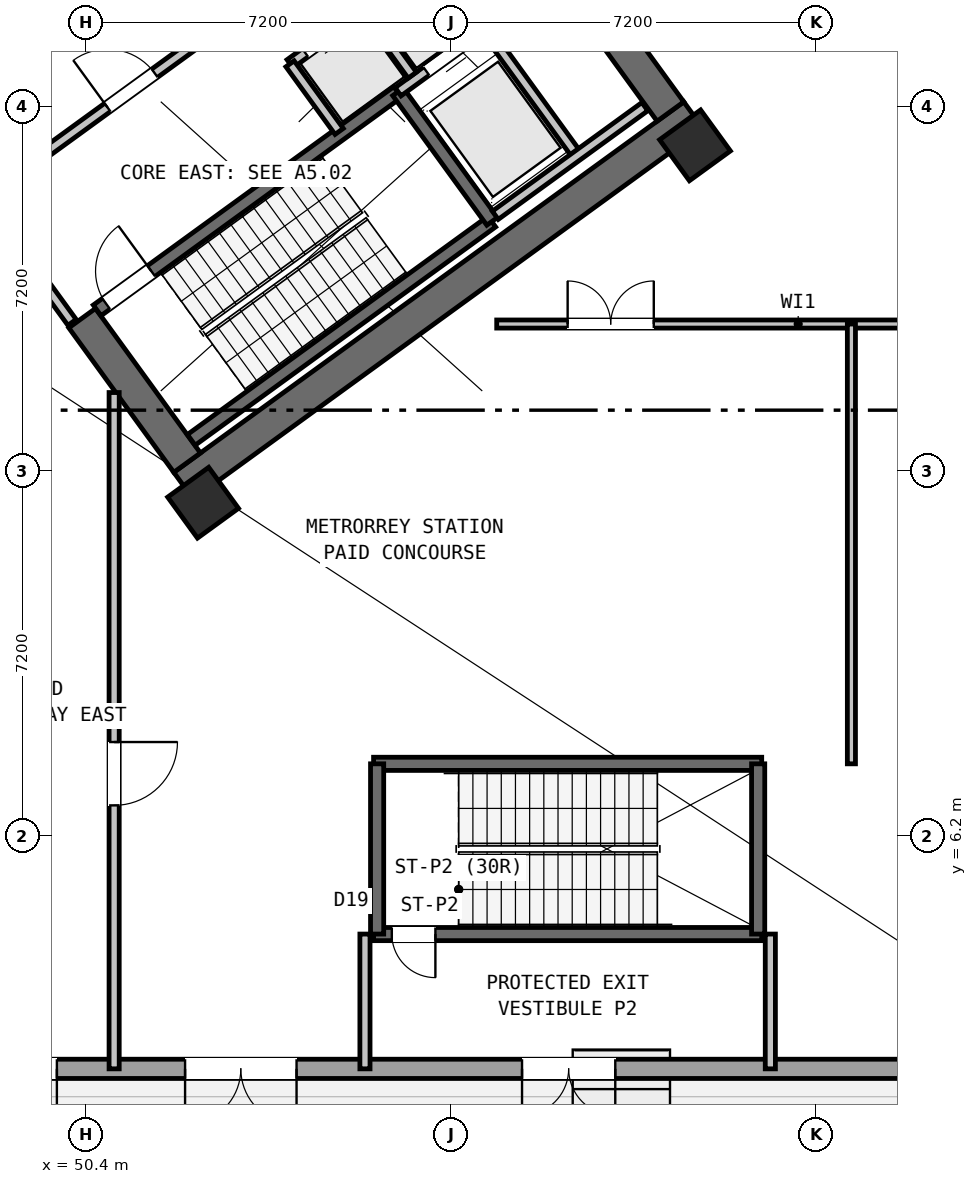
"""IFC4 building model, lengths in metres.
Left out: names, types, materials, properties, quantities, classifications, styles, units other than length and angle.
Written with IfcOpenShell. Run it as: python <this file> out.ifc"""

import sys

from ifc_helpers import new_model, si_unit, direction, frame, frame_2d, origin, origin_2d, place, context, subcontext, project, spatial, rectangle, hollow_rectangle, extrude, source, transform, mapped, element, fill, save


model = new_model("IFC4")
c1 = context("Model", 3, precision=1e-05, world=origin(), true_north=direction((0.0, 1.0)))
c2 = subcontext(c1, "Body", "Model", "MODEL_VIEW")
j1 = project(units=[si_unit("LENGTHUNIT", "METRE"), si_unit("PLANEANGLEUNIT", "RADIAN")], contexts=[c1])
p1 = place(None, origin())
s1 = spatial("IfcSite", under=j1, at=p1, CompositionType="ELEMENT")
p2 = place(p1, origin())
s2 = spatial("IfcBuilding", under=s1, at=p2, CompositionType="ELEMENT")
p3 = place(p2, origin())
s3 = spatial("IfcBuildingStorey", under=s2, at=p3, CompositionType="ELEMENT", Elevation=0.0)
p4 = place(p3, frame((52.318, 13.11, 0.0), z_axis=(0.0, 0.0, 1.0), x_axis=(0.809019445368, 0.587781878776, 0.0)))
e1 = element("IfcWall", 1, at=p4, inside=s3, PredefinedType="SHEAR", context=c2, shape_type="SweptSolid", body=[
    extrude(rectangle(XDim=12.44, YDim=0.65, at=frame_2d((6.22, 0.0))), origin(), (0.0, 0.0, 1.0), 5.05),
])
p5 = place(p3, frame((52.39, 13.564, 0.0), z_axis=(0.0, 0.0, 1.0), x_axis=(-0.58779688989, 0.809008539037, 0.0)))
e2 = element("IfcWall", 2, at=p5, inside=s3, PredefinedType="SHEAR", context=c2, shape_type="SweptSolid", body=[
    extrude(rectangle(XDim=3.525, YDim=0.65, at=frame_2d((1.763, 0.0))), origin(), (0.0, 0.0, 1.0), 5.05),
])
p6 = place(p3, frame((61.929, 20.494, 0.0), z_axis=(0.0, 0.0, 1.0), x_axis=(-0.58782982593, 0.808984607855, 0.0)))
e3 = element("IfcWall", 3, at=p6, inside=s3, PredefinedType="SHEAR", context=c2, shape_type="SweptSolid", body=[
    extrude(rectangle(XDim=3.525, YDim=0.65, at=frame_2d((1.762, 0.0))), origin(), (0.0, 0.0, 1.0), 5.05),
])
m1 = source(origin(), c2, "Body", "SweptSolid", [
    extrude(hollow_rectangle(XDim=1.0, YDim=1.0, WallThickness=0.04, at=origin_2d()), origin(), (0.0, 0.0, 1.0), 5.4),
])
for number, where, z_axis, x_axis in (
    (4, (52.705, 12.773, 0.0), (0.0, 0.0, 1.0), (0.809, 0.588, 0.0)),
    (5, (62.414, 19.827, 0.0), (0.0, 0.0, 1.0), (0.809, 0.588, 0.0)),
):
    element("IfcColumn", number, at=place(p3, frame(where, z_axis=z_axis, x_axis=x_axis)), inside=s3, PredefinedType="COLUMN", context=c2, shape_type="MappedRepresentation", body=[
        mapped(m1, transform((0.0, 0.0, 0.0), scale=1.0)),
    ])
p7 = place(p3, frame((67.117, 1.6, 0.0), z_axis=(0.0, 0.0, 1.0), x_axis=(-1.0, 0.0, 0.0)))
e6 = element("IfcWall", 6, at=p7, inside=s3, PredefinedType="STANDARD", context=c2, shape_type="SweptSolid", body=[
    extrude(rectangle(XDim=62.234, YDim=0.38, at=frame_2d((31.117, 0.0))), origin(), (0.0, 0.0, 1.0), 3.755),
])
p8 = place(p7, frame((53.077, 0.0, 0.0)))
e7 = element("IfcOpeningElement", 7, at=p8, cuts=e6, PredefinedType="OPENING", context=c2, shape_type="SweptSolid", body=[
    extrude(rectangle(XDim=1.84, YDim=2.4, at=frame_2d((0.92, 1.2))), frame((0.0, 0.2, 0.0), z_axis=(0.0, -1.0, 0.0), x_axis=(1.0, 0.0, 0.0)), (0.0, 0.0, 1.0), 0.4),
])
p9 = place(p7, frame((39.517, 0.0, 0.0)))
e8 = element("IfcOpeningElement", 8, at=p9, cuts=e6, PredefinedType="OPENING", context=c2, shape_type="SweptSolid", body=[
    extrude(rectangle(XDim=2.2, YDim=2.6, at=frame_2d((1.1, 1.3))), frame((0.0, 0.2, 0.0), z_axis=(0.0, -1.0, 0.0), x_axis=(1.0, 0.0, 0.0)), (0.0, 0.0, 1.0), 0.4),
])
p10 = place(p7, frame((32.917, 0.0, 0.0)))
e9 = element("IfcOpeningElement", 9, at=p10, cuts=e6, PredefinedType="OPENING", context=c2, shape_type="SweptSolid", body=[
    extrude(rectangle(XDim=2.2, YDim=2.6, at=frame_2d((1.1, 1.3))), frame((0.0, 0.2, 0.0), z_axis=(0.0, -1.0, 0.0), x_axis=(1.0, 0.0, 0.0)), (0.0, 0.0, 1.0), 0.4),
])
p11 = place(p7, frame((26.997, 0.0, 0.0)))
e10 = element("IfcOpeningElement", 10, at=p11, cuts=e6, PredefinedType="OPENING", context=c2, shape_type="SweptSolid", body=[
    extrude(rectangle(XDim=1.84, YDim=2.4, at=frame_2d((0.92, 1.2))), frame((0.0, 0.2, 0.0), z_axis=(0.0, -1.0, 0.0), x_axis=(1.0, 0.0, 0.0)), (0.0, 0.0, 1.0), 0.4),
])
p12 = place(p7, frame((21.017, 0.0, 0.0)))
e11 = element("IfcOpeningElement", 11, at=p12, cuts=e6, PredefinedType="OPENING", context=c2, shape_type="SweptSolid", body=[
    extrude(rectangle(XDim=2.2, YDim=2.6, at=frame_2d((1.1, 1.3))), frame((0.0, 0.2, 0.0), z_axis=(0.0, -1.0, 0.0), x_axis=(1.0, 0.0, 0.0)), (0.0, 0.0, 1.0), 0.4),
])
p13 = place(p7, frame((17.297, 0.0, 0.0)))
e12 = element("IfcOpeningElement", 12, at=p13, cuts=e6, PredefinedType="OPENING", context=c2, shape_type="SweptSolid", body=[
    extrude(rectangle(XDim=1.84, YDim=2.4, at=frame_2d((0.92, 1.2))), frame((0.0, 0.2, 0.0), z_axis=(0.0, -1.0, 0.0), x_axis=(1.0, 0.0, 0.0)), (0.0, 0.0, 1.0), 0.4),
])
p14 = place(p7, frame((12.567, 0.0, 0.0)))
e13 = element("IfcOpeningElement", 13, at=p14, cuts=e6, PredefinedType="OPENING", context=c2, shape_type="SweptSolid", body=[
    extrude(rectangle(XDim=2.2, YDim=2.6, at=frame_2d((1.1, 1.3))), frame((0.0, 0.2, 0.0), z_axis=(0.0, -1.0, 0.0), x_axis=(1.0, 0.0, 0.0)), (0.0, 0.0, 1.0), 0.4),
])
p15 = place(p7, frame((6.277, 0.0, 0.0)))
e14 = element("IfcOpeningElement", 14, at=p15, cuts=e6, PredefinedType="OPENING", context=c2, shape_type="SweptSolid", body=[
    extrude(rectangle(XDim=1.84, YDim=2.4, at=frame_2d((0.92, 1.2))), frame((0.0, 0.2, 0.0), z_axis=(0.0, -1.0, 0.0), x_axis=(1.0, 0.0, 0.0)), (0.0, 0.0, 1.0), 0.4),
])
p16 = place(p3, frame((52.472, 14.013, 0.0), z_axis=(0.0, 0.0, 1.0), x_axis=(0.809028366311, 0.587769599847, 0.0)))
e15 = element("IfcWall", 15, at=p16, inside=s3, PredefinedType="SHEAR", context=c2, shape_type="SweptSolid", body=[
    extrude(rectangle(XDim=7.33, YDim=0.26, at=frame_2d((3.665, 0.0))), origin(), (0.0, 0.0, 1.0), 5.05),
])
p17 = place(p3, frame((50.615, 16.57, 0.0), z_axis=(0.0, 0.0, 1.0), x_axis=(0.809028366311, 0.587769599847, 0.0)))
e16 = element("IfcWall", 16, at=p17, inside=s3, PredefinedType="SHEAR", context=c2, shape_type="SweptSolid", body=[
    extrude(rectangle(XDim=7.33, YDim=0.26, at=frame_2d((3.665, 0.0))), origin(), (0.0, 0.0, 1.0), 5.05),
])
p18 = place(p17, frame((0.22, 0.0, 0.0)))
e17 = element("IfcOpeningElement", 17, at=p18, cuts=e16, PredefinedType="OPENING", context=c2, shape_type="SweptSolid", body=[
    extrude(rectangle(XDim=1.1, YDim=2.1, at=frame_2d((0.55, 1.05))), frame((0.0, 0.14, 0.0), z_axis=(0.0, -1.0, 0.0), x_axis=(1.0, 0.0, 0.0)), (0.0, 0.0, 1.0), 0.28),
])
p19 = place(p3, frame((58.41, 18.327, 0.0), z_axis=(0.0, 0.0, 1.0), x_axis=(-0.58776738483, 0.809029975545, 0.0)))
e18 = element("IfcWall", 18, at=p19, inside=s3, PredefinedType="SHEAR", context=c2, shape_type="SweptSolid", body=[
    extrude(rectangle(XDim=3.16, YDim=0.26, at=frame_2d((1.58, 0.0))), origin(), (0.0, 0.0, 1.0), 5.05),
])
p20 = place(p3, frame((47.106, 21.437, 0.0), z_axis=(0.0, 0.0, 1.0), x_axis=(0.809012514015, 0.58779141893, 0.0)))
e19 = element("IfcWall", 19, at=p20, inside=s3, PredefinedType="STANDARD", context=c2, shape_type="SweptSolid", body=[
    extrude(rectangle(XDim=3.398, YDim=0.2, at=frame_2d((1.699, 0.0))), origin(), (0.0, 0.0, 1.0), 5.04),
])
p21 = place(p20, frame((0.408, 0.0, 0.0)))
e20 = element("IfcOpeningElement", 20, at=p21, cuts=e19, PredefinedType="OPENING", context=c2, shape_type="SweptSolid", body=[
    extrude(rectangle(XDim=1.3, YDim=2.2, at=frame_2d((0.65, 1.1))), frame((0.0, 0.11, 0.0), z_axis=(0.0, -1.0, 0.0), x_axis=(1.0, 0.0, 0.0)), (0.0, 0.0, 1.0), 0.22),
])
p22 = place(p3, frame((48.799, 19.107, 0.0), z_axis=(0.0, 0.0, 1.0), x_axis=(0.809012959416, 0.587790805897, 0.0)))
e21 = element("IfcWall", 21, at=p22, inside=s3, PredefinedType="STANDARD", context=c2, shape_type="SweptSolid", body=[
    extrude(rectangle(XDim=5.718, YDim=0.2, at=frame_2d((2.859, 0.0))), origin(), (0.0, 0.0, 1.0), 5.04),
])
p23 = place(p22, frame((2.498, 0.0, 0.0)))
e22 = element("IfcOpeningElement", 22, at=p23, cuts=e21, PredefinedType="OPENING", context=c2, shape_type="SweptSolid", body=[
    extrude(rectangle(XDim=1.15, YDim=2.1, at=frame_2d((0.575, 1.05))), frame((0.0, 0.11, 0.0), z_axis=(0.0, -1.0, 0.0), x_axis=(1.0, 0.0, 0.0)), (0.0, 0.0, 1.0), 0.22),
])
p24 = place(p3, frame((56.553, 20.884, 0.0), z_axis=(0.0, 0.0, 1.0), x_axis=(0.809035789462, 0.587759382205, 0.0)))
e23 = element("IfcWall", 23, at=p24, inside=s3, PredefinedType="STANDARD", context=c2, shape_type="SweptSolid", body=[
    extrude(rectangle(XDim=3.768, YDim=0.2, at=frame_2d((1.884, 0.0))), origin(), (0.0, 0.0, 1.0), 5.04),
])
p25 = place(p24, frame((0.69, 0.0, 0.0)))
e24 = element("IfcOpeningElement", 24, at=p25, cuts=e23, PredefinedType="OPENING", context=c2, shape_type="SweptSolid", body=[
    extrude(rectangle(XDim=1.1, YDim=2.15, at=frame_2d((0.55, 1.075))), frame((0.0, 0.11, 0.0), z_axis=(0.0, -1.0, 0.0), x_axis=(1.0, 0.0, 0.0)), (0.0, 0.0, 1.0), 0.22),
])
p26 = place(p24, frame((2.65, 0.0, 0.0)))
e25 = element("IfcOpeningElement", 25, at=p26, cuts=e23, PredefinedType="OPENING", context=c2, shape_type="SweptSolid", body=[
    extrude(rectangle(XDim=0.86, YDim=2.05, at=frame_2d((0.43, 1.025))), frame((0.0, 0.11, 0.0), z_axis=(0.0, -1.0, 0.0), x_axis=(1.0, 0.0, 0.0)), (0.0, 0.0, 1.0), 0.22),
])
p27 = place(p3, frame((54.421, 21.436, 0.0), z_axis=(0.0, 0.0, 1.0), x_axis=(0.809013710463, 0.587789772183, 0.0)))
e26 = element("IfcWall", 26, at=p27, inside=s3, PredefinedType="STANDARD", context=c2, shape_type="SweptSolid", body=[
    extrude(rectangle(XDim=5.36, YDim=0.2, at=frame_2d((2.68, 0.0))), origin(), (0.0, 0.0, 1.0), 5.04),
])
p28 = place(p27, frame((0.37, 0.0, 0.0)))
e27 = element("IfcOpeningElement", 27, at=p28, cuts=e26, PredefinedType="OPENING", context=c2, shape_type="SweptSolid", body=[
    extrude(rectangle(XDim=1.1, YDim=2.15, at=frame_2d((0.55, 1.075))), frame((0.0, 0.11, 0.0), z_axis=(0.0, -1.0, 0.0), x_axis=(1.0, 0.0, 0.0)), (0.0, 0.0, 1.0), 0.22),
])
p29 = place(p27, frame((2.17, 0.0, 0.0)))
e28 = element("IfcOpeningElement", 28, at=p29, cuts=e26, PredefinedType="OPENING", context=c2, shape_type="SweptSolid", body=[
    extrude(rectangle(XDim=1.1, YDim=2.15, at=frame_2d((0.55, 1.075))), frame((0.0, 0.11, 0.0), z_axis=(0.0, -1.0, 0.0), x_axis=(1.0, 0.0, 0.0)), (0.0, 0.0, 1.0), 0.22),
])
p30 = place(p27, frame((3.97, 0.0, 0.0)))
e29 = element("IfcOpeningElement", 29, at=p30, cuts=e26, PredefinedType="OPENING", context=c2, shape_type="SweptSolid", body=[
    extrude(rectangle(XDim=1.1, YDim=2.15, at=frame_2d((0.55, 1.075))), frame((0.0, 0.11, 0.0), z_axis=(0.0, -1.0, 0.0), x_axis=(1.0, 0.0, 0.0)), (0.0, 0.0, 1.0), 0.22),
])
p31 = place(p3, frame((55.391, 20.102, 0.0), z_axis=(0.0, 0.0, 1.0), x_axis=(-0.58778447739, 0.809017557374, 0.0)))
e30 = element("IfcWall", 30, at=p31, inside=s3, PredefinedType="STANDARD", context=c2, shape_type="SweptSolid", body=[
    extrude(rectangle(XDim=1.65, YDim=0.2, at=frame_2d((0.825, 0.0))), origin(), (0.0, 0.0, 1.0), 5.04),
])
p32 = place(p3, frame((56.834, 21.212, 0.0), z_axis=(0.0, 0.0, 1.0), x_axis=(-0.58776738483, 0.809029975545, 0.0)))
e31 = element("IfcWall", 31, at=p32, inside=s3, PredefinedType="STANDARD", context=c2, shape_type="SweptSolid", body=[
    extrude(rectangle(XDim=1.58, YDim=0.2, at=frame_2d((0.79, 0.0))), origin(), (0.0, 0.0, 1.0), 5.04),
])
p33 = place(p3, frame((60.067, 19.655, 0.0), z_axis=(0.0, 0.0, 1.0), x_axis=(-0.587800520745, 0.809005900975, 0.0)))
e32 = element("IfcWall", 32, at=p33, inside=s3, PredefinedType="STANDARD", context=c2, shape_type="SweptSolid", body=[
    extrude(rectangle(XDim=2.66, YDim=0.2, at=frame_2d((1.33, 0.0))), origin(), (0.0, 0.0, 1.0), 5.04),
])
p34 = place(p3, frame((58.472, 18.447, 0.0), z_axis=(0.0, 0.0, 1.0), x_axis=(0.809022487728, 0.587777691266, 0.0)))
e33 = element("IfcWall", 33, at=p34, inside=s3, PredefinedType="STANDARD", context=c2, shape_type="SweptSolid", body=[
    extrude(rectangle(XDim=3.648, YDim=0.2, at=frame_2d((1.824, 0.0))), origin(), (0.0, 0.0, 1.0), 5.04),
])
p35 = place(p3, frame((56.07, 7.62, 0.0), z_axis=(0.0, 0.0, 1.0), x_axis=(1.0, 0.0, 0.0)))
e34 = element("IfcWall", 34, at=p35, inside=s3, PredefinedType="SHEAR", context=c2, shape_type="SweptSolid", body=[
    extrude(rectangle(XDim=7.66, YDim=0.26, at=frame_2d((3.83, 0.0))), origin(), (0.0, 0.0, 1.0), 5.2),
])
p36 = place(p3, frame((56.07, 4.26, 0.0), z_axis=(0.0, 0.0, 1.0), x_axis=(1.0, 0.0, 0.0)))
e35 = element("IfcWall", 35, at=p36, inside=s3, PredefinedType="SHEAR", context=c2, shape_type="SweptSolid", body=[
    extrude(rectangle(XDim=7.66, YDim=0.26, at=frame_2d((3.83, 0.0))), origin(), (0.0, 0.0, 1.0), 5.2),
])
p37 = place(p36, frame((0.36, 0.0, 0.0)))
e36 = element("IfcOpeningElement", 36, at=p37, cuts=e35, PredefinedType="OPENING", context=c2, shape_type="SweptSolid", body=[
    extrude(rectangle(XDim=0.86, YDim=2.05, at=frame_2d((0.43, 1.025))), frame((0.0, 0.14, 0.0), z_axis=(0.0, -1.0, 0.0), x_axis=(1.0, 0.0, 0.0)), (0.0, 0.0, 1.0), 0.28),
])
for number, where, z_axis, x_axis in (
    (37, (56.14, 4.26, 0.0), (0.0, 0.0, 1.0), (0.0, 1.0, 0.0)),
    (38, (63.66, 4.26, 0.0), (0.0, 0.0, 1.0), (0.0, 1.0, 0.0)),
):
    element("IfcWall", number, at=place(p3, frame(where, z_axis=z_axis, x_axis=x_axis)), inside=s3, PredefinedType="SHEAR", context=c2, shape_type="SweptSolid", body=[
        extrude(rectangle(XDim=3.36, YDim=0.26, at=frame_2d((1.68, 0.0))), origin(), (0.0, 0.0, 1.0), 5.2),
    ])
p38 = place(p3, frame((50.95, 1.6, 0.0), z_axis=(0.0, 0.0, 1.0), x_axis=(0.0, 1.0, 0.0)))
e39 = element("IfcWall", 39, at=p38, inside=s3, PredefinedType="STANDARD", context=c2, shape_type="SweptSolid", body=[
    extrude(rectangle(XDim=13.348, YDim=0.2, at=frame_2d((6.674, 0.0))), origin(), (0.0, 0.0, 1.0), 5.04),
])
p39 = place(p38, frame((5.2, 0.0, 0.0)))
e40 = element("IfcOpeningElement", 40, at=p39, cuts=e39, PredefinedType="OPENING", context=c2, shape_type="SweptSolid", body=[
    extrude(rectangle(XDim=1.25, YDim=2.15, at=frame_2d((0.625, 1.075))), frame((0.0, 0.11, 0.0), z_axis=(0.0, -1.0, 0.0), x_axis=(1.0, 0.0, 0.0)), (0.0, 0.0, 1.0), 0.22),
])
p40 = place(p3, frame((50.119, 16.333, 0.0), z_axis=(0.0, 0.0, 1.0), x_axis=(-0.587749856981, 0.809042709391, 0.0)))
e41 = element("IfcWall", 41, at=p40, inside=s3, PredefinedType="STANDARD", context=c2, shape_type="SweptSolid", body=[
    extrude(rectangle(XDim=2.96, YDim=0.2, at=frame_2d((1.48, 0.0))), origin(), (0.0, 0.0, 1.0), 5.04),
])
p41 = place(p40, frame((1.45, 0.0, 0.0)))
e42 = element("IfcOpeningElement", 42, at=p41, cuts=e41, PredefinedType="OPENING", context=c2, shape_type="SweptSolid", body=[
    extrude(rectangle(XDim=1.25, YDim=2.15, at=frame_2d((0.625, 1.075))), frame((0.0, 0.11, 0.0), z_axis=(0.0, -1.0, 0.0), x_axis=(1.0, 0.0, 0.0)), (0.0, 0.0, 1.0), 0.22),
])
for number, where, z_axis, x_axis in (
    (43, (55.9, 1.6, 0.0), (0.0, 0.0, 1.0), (0.0, 1.0, 0.0)),
    (44, (63.9, 1.6, 0.0), (0.0, 0.0, 1.0), (0.0, 1.0, 0.0)),
):
    element("IfcWall", number, at=place(p3, frame(where, z_axis=z_axis, x_axis=x_axis)), inside=s3, PredefinedType="STANDARD", context=c2, shape_type="SweptSolid", body=[
        extrude(rectangle(XDim=2.66, YDim=0.2, at=frame_2d((1.33, 0.0))), origin(), (0.0, 0.0, 1.0), 5.04),
    ])
p42 = place(p3, frame((58.5, 16.3, 0.0), z_axis=(0.0, 0.0, 1.0), x_axis=(1.0, 0.0, 0.0)))
e45 = element("IfcWall", 45, at=p42, inside=s3, PredefinedType="PARTITIONING", context=c2, shape_type="SweptSolid", body=[
    extrude(rectangle(XDim=11.9, YDim=0.16, at=frame_2d((5.95, 0.0))), origin(), (0.0, 0.0, 1.0), 5.04),
])
p43 = place(p42, frame((1.4, 0.0, 0.0)))
e46 = element("IfcOpeningElement", 46, at=p43, cuts=e45, PredefinedType="OPENING", context=c2, shape_type="SweptSolid", body=[
    extrude(rectangle(XDim=1.7, YDim=2.2, at=frame_2d((0.85, 1.1))), frame((0.0, 0.09, 0.0), z_axis=(0.0, -1.0, 0.0), x_axis=(1.0, 0.0, 0.0)), (0.0, 0.0, 1.0), 0.18),
])
p44 = place(p3, frame((65.5, 7.62, 0.0), z_axis=(0.0, 0.0, 1.0), x_axis=(0.0, 1.0, 0.0)))
e47 = element("IfcWall", 47, at=p44, inside=s3, PredefinedType="PARTITIONING", context=c2, shape_type="SweptSolid", body=[
    extrude(rectangle(XDim=8.68, YDim=0.16, at=frame_2d((4.34, 0.0))), origin(), (0.0, 0.0, 1.0), 5.04),
])
m2 = source(origin(), c2, "Body", "SweptSolid", [
    extrude(rectangle(XDim=1.84, YDim=2.4, at=frame_2d((0.92, 1.2))), frame((0.0, 0.025, 0.0), z_axis=(0.0, -1.0, 0.0), x_axis=(1.0, 0.0, 0.0)), (0.0, 0.0, 1.0), 0.05),
])
p45 = place(p13, origin())
e48 = element("IfcDoor", 48, at=p45, inside=s3, OperationType="DOUBLE_DOOR_SINGLE_SWING", PredefinedType="DOOR", context=c2, shape_type="MappedRepresentation", body=[
    mapped(m2, transform((0.0, 0.0, 0.0), scale=1.0)),
])
fill(e12, e48)
m3 = source(origin(), c2, "Body", "SweptSolid", [
    extrude(rectangle(XDim=2.2, YDim=2.6, at=frame_2d((1.1, 1.3))), frame((0.0, 0.025, 0.0), z_axis=(0.0, -1.0, 0.0), x_axis=(1.0, 0.0, 0.0)), (0.0, 0.0, 1.0), 0.05),
])
p46 = place(p14, origin())
e49 = element("IfcDoor", 49, at=p46, inside=s3, OperationType="DOUBLE_DOOR_SINGLE_SWING", PredefinedType="DOOR", context=c2, shape_type="MappedRepresentation", body=[
    mapped(m3, transform((0.0, 0.0, 0.0), scale=1.0)),
])
fill(e13, e49)
p47 = place(p15, origin())
e50 = element("IfcDoor", 50, at=p47, inside=s3, OperationType="DOUBLE_DOOR_SINGLE_SWING", PredefinedType="DOOR", context=c2, shape_type="MappedRepresentation", body=[
    mapped(m2, transform((0.0, 0.0, 0.0), scale=1.0)),
])
fill(e14, e50)
m4 = source(origin(), c2, "Body", "SweptSolid", [
    extrude(rectangle(XDim=1.1, YDim=2.1, at=frame_2d((0.55, 1.05))), frame((0.0, 0.025, 0.0), z_axis=(0.0, -1.0, 0.0), x_axis=(1.0, 0.0, 0.0)), (0.0, 0.0, 1.0), 0.05),
])
p48 = place(p18, origin())
e51 = element("IfcDoor", 51, at=p48, inside=s3, OperationType="SINGLE_SWING_RIGHT", PredefinedType="DOOR", context=c2, shape_type="MappedRepresentation", body=[
    mapped(m4, transform((0.0, 0.0, 0.0), scale=1.0)),
])
fill(e17, e51)
m5 = source(origin(), c2, "Body", "SweptSolid", [
    extrude(rectangle(XDim=1.15, YDim=2.1, at=frame_2d((0.575, 1.05))), frame((0.0, 0.025, 0.0), z_axis=(0.0, -1.0, 0.0), x_axis=(1.0, 0.0, 0.0)), (0.0, 0.0, 1.0), 0.05),
])
p49 = place(p23, origin())
e52 = element("IfcDoor", 52, at=p49, inside=s3, OperationType="SINGLE_SWING_LEFT", PredefinedType="DOOR", context=c2, shape_type="MappedRepresentation", body=[
    mapped(m5, transform((0.0, 0.0, 0.0), scale=1.0)),
])
fill(e22, e52)
m6 = source(origin(), c2, "Body", "SweptSolid", [
    extrude(rectangle(XDim=1.1, YDim=2.15, at=frame_2d((0.55, 1.075))), frame((0.0, 0.025, 0.0), z_axis=(0.0, -1.0, 0.0), x_axis=(1.0, 0.0, 0.0)), (0.0, 0.0, 1.0), 0.05),
])
p50 = place(p28, origin())
e53 = element("IfcDoor", 53, at=p50, inside=s3, OperationType="DOUBLE_DOOR_SLIDING", PredefinedType="DOOR", context=c2, shape_type="MappedRepresentation", body=[
    mapped(m6, transform((0.0, 0.0, 0.0), scale=1.0)),
])
fill(e27, e53)
p51 = place(p25, origin())
e54 = element("IfcDoor", 54, at=p51, inside=s3, OperationType="DOUBLE_DOOR_SLIDING", PredefinedType="DOOR", context=c2, shape_type="MappedRepresentation", body=[
    mapped(m6, transform((0.0, 0.0, 0.0), scale=1.0)),
])
fill(e24, e54)
m7 = source(origin(), c2, "Body", "SweptSolid", [
    extrude(rectangle(XDim=1.25, YDim=2.15, at=frame_2d((0.625, 1.075))), frame((0.0, 0.025, 0.0), z_axis=(0.0, -1.0, 0.0), x_axis=(1.0, 0.0, 0.0)), (0.0, 0.0, 1.0), 0.05),
])
p52 = place(p39, frame((1.25, 0.0, 0.0), z_axis=(0.0, 0.0, 1.0), x_axis=(-1.0, 0.0, 0.0)))
e55 = element("IfcDoor", 55, at=p52, inside=s3, OperationType="SINGLE_SWING_LEFT", PredefinedType="DOOR", context=c2, shape_type="MappedRepresentation", body=[
    mapped(m7, transform((0.0, 0.0, 0.0), scale=1.0)),
])
fill(e40, e55)
m8 = source(origin(), c2, "Body", "SweptSolid", [
    extrude(rectangle(XDim=0.86, YDim=2.05, at=frame_2d((0.43, 1.025))), frame((0.0, 0.025, 0.0), z_axis=(0.0, -1.0, 0.0), x_axis=(1.0, 0.0, 0.0)), (0.0, 0.0, 1.0), 0.05),
])
p53 = place(p37, frame((0.86, 0.0, 0.0), z_axis=(0.0, 0.0, 1.0), x_axis=(-1.0, 0.0, 0.0)))
e56 = element("IfcDoor", 56, at=p53, inside=s3, OperationType="SINGLE_SWING_LEFT", PredefinedType="DOOR", context=c2, shape_type="MappedRepresentation", body=[
    mapped(m8, transform((0.0, 0.0, 0.0), scale=1.0)),
])
fill(e36, e56)
m9 = source(origin(), c2, "Body", "SweptSolid", [
    extrude(rectangle(XDim=1.7, YDim=2.2, at=frame_2d((0.85, 1.1))), frame((0.0, 0.025, 0.0), z_axis=(0.0, -1.0, 0.0), x_axis=(1.0, 0.0, 0.0)), (0.0, 0.0, 1.0), 0.05),
])
p54 = place(p43, origin())
e57 = element("IfcDoor", 57, at=p54, inside=s3, OperationType="DOUBLE_DOOR_SINGLE_SWING", PredefinedType="DOOR", context=c2, shape_type="MappedRepresentation", body=[
    mapped(m9, transform((0.0, 0.0, 0.0), scale=1.0)),
])
fill(e46, e57)
save(model, sys.argv[1])
